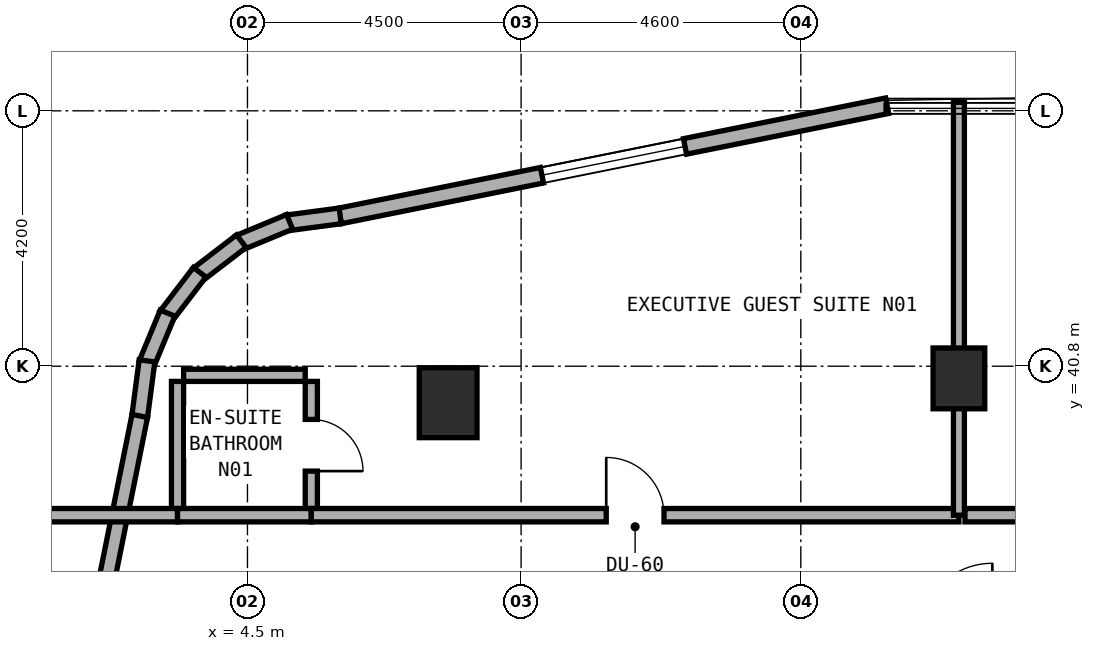
"""IFC4 building model, lengths in metres.
Left out: names, types, materials, properties, quantities, classifications, styles, units other than length and angle.
Written with IfcOpenShell. Run it as: python <this file> out.ifc"""

import sys

from ifc_helpers import new_model, si_unit, direction, frame, frame_2d, origin, origin_2d, place, context, subcontext, project, spatial, rectangle, extrude, element, fill, save


model = new_model("IFC4")
c1 = context("Model", 3, precision=1e-05, world=origin(), true_north=direction((0.0, 1.0)))
c2 = subcontext(c1, "Body", "Model", "MODEL_VIEW")
j1 = project(units=[si_unit("LENGTHUNIT", "METRE"), si_unit("PLANEANGLEUNIT", "RADIAN")], contexts=[c1])
p1 = place(None, origin())
s1 = spatial("IfcSite", under=j1, at=p1, CompositionType="ELEMENT")
p2 = place(p1, origin())
s2 = spatial("IfcBuilding", under=s1, at=p2, CompositionType="ELEMENT")
p3 = place(p2, frame((0.0, 0.0, 98.5)))
s3 = spatial("IfcBuildingStorey", under=s2, at=p3, CompositionType="ELEMENT", Elevation=98.5)
p4 = place(p3, frame((16.2, 40.6, 0.0), z_axis=(0.0, 0.0, 1.0), x_axis=(1.0, 0.0, 0.0)))
e1 = element("IfcColumn", 1, at=p4, inside=s3, PredefinedType="COLUMN", context=c2, shape_type="SweptSolid", body=[
    extrude(rectangle(XDim=0.85, YDim=1.0, at=origin_2d()), origin(), (0.0, 0.0, 1.0), 3.5),
])
p5 = place(p3, frame((7.8, 40.2, 0.0), z_axis=(0.0, 0.0, 1.0), x_axis=(1.0, 0.0, 0.0)))
e2 = element("IfcColumn", 2, at=p5, inside=s3, PredefinedType="COLUMN", context=c2, shape_type="SweptSolid", body=[
    extrude(rectangle(XDim=0.95, YDim=1.15, at=origin_2d()), origin(), (0.0, 0.0, 1.0), 3.5),
])
p6 = place(p3, frame((15.02, 45.084, 0.0), z_axis=(0.0, 0.0, 1.0), x_axis=(-0.980315963543, -0.197435082048, 0.0)))
e3 = element("IfcWall", 3, at=p6, inside=s3, PredefinedType="STANDARD", context=c2, shape_type="SweptSolid", body=[
    extrude(rectangle(XDim=9.183, YDim=0.26, at=frame_2d((4.591, 0.0))), origin(), (0.0, 0.0, 1.0), 3.22),
])
p7 = place(p6, frame((3.391, 0.0, 0.8)))
e4 = element("IfcOpeningElement", 4, at=p7, cuts=e3, PredefinedType="OPENING", context=c2, shape_type="SweptSolid", body=[
    extrude(rectangle(XDim=2.4, YDim=1.6, at=frame_2d((1.2, 0.8))), frame((0.0, 0.14, 0.0), z_axis=(0.0, -1.0, 0.0), x_axis=(1.0, 0.0, 0.0)), (0.0, 0.0, 1.0), 0.28),
])
p8 = place(p3, frame((6.025, 43.272, 0.0), z_axis=(0.0, 0.0, 1.0), x_axis=(-0.991388484223, -0.130953706898, 0.0)))
e5 = element("IfcWall", 5, at=p8, inside=s3, PredefinedType="STANDARD", context=c2, shape_type="SweptSolid", body=[
    extrude(rectangle(XDim=0.885, YDim=0.26, at=frame_2d((0.443, 0.0))), origin(), (0.0, 0.0, 1.0), 3.22),
])
p9 = place(p3, frame((5.193, 43.174, 0.0), z_axis=(0.0, 0.0, 1.0), x_axis=(-0.923627776508, -0.383290660547, 0.0)))
e6 = element("IfcWall", 6, at=p9, inside=s3, PredefinedType="STANDARD", context=c2, shape_type="SweptSolid", body=[
    extrude(rectangle(XDim=0.903, YDim=0.26, at=frame_2d((0.452, 0.0))), origin(), (0.0, 0.0, 1.0), 3.22),
])
p10 = place(p3, frame((4.399, 42.856, 0.0), z_axis=(0.0, 0.0, 1.0), x_axis=(-0.793458244748, -0.608624690463, 0.0)))
e7 = element("IfcWall", 7, at=p10, inside=s3, PredefinedType="STANDARD", context=c2, shape_type="SweptSolid", body=[
    extrude(rectangle(XDim=0.902, YDim=0.26, at=frame_2d((0.451, 0.0))), origin(), (0.0, 0.0, 1.0), 3.22),
])
p11 = place(p3, frame((3.714, 42.345, 0.0), z_axis=(0.0, 0.0, 1.0), x_axis=(-0.608494022858, -0.793558456666, 0.0)))
e8 = element("IfcWall", 8, at=p11, inside=s3, PredefinedType="STANDARD", context=c2, shape_type="SweptSolid", body=[
    extrude(rectangle(XDim=0.902, YDim=0.26, at=frame_2d((0.451, 0.0))), origin(), (0.0, 0.0, 1.0), 3.22),
])
p12 = place(p3, frame((3.186, 41.673, 0.0), z_axis=(0.0, 0.0, 1.0), x_axis=(-0.383155708213, -0.923683767999, 0.0)))
e9 = element("IfcWall", 9, at=p12, inside=s3, PredefinedType="STANDARD", context=c2, shape_type="SweptSolid", body=[
    extrude(rectangle(XDim=0.903, YDim=0.26, at=frame_2d((0.451, 0.0))), origin(), (0.0, 0.0, 1.0), 3.22),
])
p13 = place(p3, frame((2.848, 40.888, 0.0), z_axis=(0.0, 0.0, 1.0), x_axis=(-0.130200706103, -0.991487658083, 0.0)))
e10 = element("IfcWall", 10, at=p13, inside=s3, PredefinedType="STANDARD", context=c2, shape_type="SweptSolid", body=[
    extrude(rectangle(XDim=0.921, YDim=0.26, at=frame_2d((0.46, 0.0))), origin(), (0.0, 0.0, 1.0), 3.22),
])
p14 = place(p3, frame((2.729, 39.982, 0.0), z_axis=(0.0, 0.0, 1.0), x_axis=(-0.197435082048, -0.980315963543, 0.0)))
e11 = element("IfcWall", 11, at=p14, inside=s3, PredefinedType="STANDARD", context=c2, shape_type="SweptSolid", body=[
    extrude(rectangle(XDim=9.183, YDim=0.26, at=frame_2d((4.591, 0.0))), origin(), (0.0, 0.0, 1.0), 3.22),
])
p15 = place(p14, frame((4.286, 0.0, 0.8)))
e12 = element("IfcOpeningElement", 12, at=p15, cuts=e11, PredefinedType="OPENING", context=c2, shape_type="SweptSolid", body=[
    extrude(rectangle(XDim=2.4, YDim=1.6, at=frame_2d((1.2, 0.8))), frame((0.0, 0.14, 0.0), z_axis=(0.0, -1.0, 0.0), x_axis=(1.0, 0.0, 0.0)), (0.0, 0.0, 1.0), 0.28),
])
p16 = place(p3, frame((5.55, 38.45, 0.0), z_axis=(0.0, 0.0, 1.0), x_axis=(0.0, 1.0, 0.0)))
e13 = element("IfcWall", 13, at=p16, inside=s3, PredefinedType="PLUMBINGWALL", context=c2, shape_type="SweptSolid", body=[
    extrude(rectangle(XDim=2.1, YDim=0.2, at=frame_2d((1.05, 0.0))), origin(), (0.0, 0.0, 1.0), 3.22),
])
p17 = place(p16, frame((0.625, 0.0, 0.0)))
e14 = element("IfcOpeningElement", 14, at=p17, cuts=e13, PredefinedType="OPENING", context=c2, shape_type="SweptSolid", body=[
    extrude(rectangle(XDim=0.85, YDim=2.1, at=frame_2d((0.425, 1.05))), frame((0.0, 0.11, 0.0), z_axis=(0.0, -1.0, 0.0), x_axis=(1.0, 0.0, 0.0)), (0.0, 0.0, 1.0), 0.22),
])
p18 = place(p3, frame((3.45, 40.65, 0.0), z_axis=(0.0, 0.0, 1.0), x_axis=(1.0, 0.0, 0.0)))
e15 = element("IfcWall", 15, at=p18, inside=s3, PredefinedType="PLUMBINGWALL", context=c2, shape_type="SweptSolid", body=[
    extrude(rectangle(XDim=2.0, YDim=0.2, at=frame_2d((1.0, 0.0))), origin(), (0.0, 0.0, 1.0), 3.22),
])
p19 = place(p3, frame((3.35, 38.45, 0.0), z_axis=(0.0, 0.0, 1.0), x_axis=(0.0, 1.0, 0.0)))
e16 = element("IfcWall", 16, at=p19, inside=s3, PredefinedType="PLUMBINGWALL", context=c2, shape_type="SweptSolid", body=[
    extrude(rectangle(XDim=2.1, YDim=0.2, at=frame_2d((1.05, 0.0))), origin(), (0.0, 0.0, 1.0), 3.22),
])
p20 = place(p3, frame((0.96, 38.35, 0.0), z_axis=(0.0, 0.0, 1.0), x_axis=(1.0, 0.0, 0.0)))
e17 = element("IfcWall", 17, at=p20, inside=s3, PredefinedType="SOLIDWALL", context=c2, shape_type="SweptSolid", body=[
    extrude(rectangle(XDim=2.39, YDim=0.22, at=frame_2d((1.195, 0.0))), origin(), (0.0, 0.0, 1.0), 3.22),
])
p21 = place(p3, frame((3.35, 38.35, 0.0), z_axis=(0.0, 0.0, 1.0), x_axis=(1.0, 0.0, 0.0)))
e18 = element("IfcWall", 18, at=p21, inside=s3, PredefinedType="SOLIDWALL", context=c2, shape_type="SweptSolid", body=[
    extrude(rectangle(XDim=2.2, YDim=0.22, at=frame_2d((1.1, 0.0))), origin(), (0.0, 0.0, 1.0), 3.22),
])
p22 = place(p3, frame((5.55, 38.35, 0.0), z_axis=(0.0, 0.0, 1.0), x_axis=(1.0, 0.0, 0.0)))
e19 = element("IfcWall", 19, at=p22, inside=s3, PredefinedType="SOLIDWALL", context=c2, shape_type="SweptSolid", body=[
    extrude(rectangle(XDim=10.65, YDim=0.22, at=frame_2d((5.325, 0.0))), origin(), (0.0, 0.0, 1.0), 2.595),
])
p23 = place(p22, frame((4.85, 0.0, 0.0)))
e20 = element("IfcOpeningElement", 20, at=p23, cuts=e19, PredefinedType="OPENING", context=c2, shape_type="SweptSolid", body=[
    extrude(rectangle(XDim=0.95, YDim=2.1, at=frame_2d((0.475, 1.05))), frame((0.0, 0.12, 0.0), z_axis=(0.0, -1.0, 0.0), x_axis=(1.0, 0.0, 0.0)), (0.0, 0.0, 1.0), 0.24),
])
p24 = place(p3, frame((16.2, 38.35, 0.0), z_axis=(0.0, 0.0, 1.0), x_axis=(0.0, 1.0, 0.0)))
e21 = element("IfcWall", 21, at=p24, inside=s3, PredefinedType="SOLIDWALL", context=c2, shape_type="SweptSolid", body=[
    extrude(rectangle(XDim=6.79, YDim=0.18, at=frame_2d((3.395, 0.0))), origin(), (0.0, 0.0, 1.0), 2.595),
])
p25 = place(p3, frame((16.3, 38.35, 0.0), z_axis=(0.0, 0.0, 1.0), x_axis=(1.0, 0.0, 0.0)))
e22 = element("IfcWall", 22, at=p25, inside=s3, PredefinedType="SOLIDWALL", context=c2, shape_type="SweptSolid", body=[
    extrude(rectangle(XDim=9.4, YDim=0.22, at=frame_2d((4.7, 0.0))), origin(), (0.0, 0.0, 1.0), 3.22),
])
p26 = place(p25, frame((3.793, 0.0, 0.0)))
e23 = element("IfcOpeningElement", 23, at=p26, cuts=e22, PredefinedType="OPENING", context=c2, shape_type="SweptSolid", body=[
    extrude(rectangle(XDim=0.95, YDim=2.1, at=frame_2d((0.475, 1.05))), frame((0.0, 0.12, 0.0), z_axis=(0.0, -1.0, 0.0), x_axis=(1.0, 0.0, 0.0)), (0.0, 0.0, 1.0), 0.24),
])
p27 = place(p7, origin())
e24 = element("IfcWindow", 24, at=p27, inside=s3, PartitioningType="SINGLE_PANEL", PredefinedType="WINDOW", context=c2, shape_type="SweptSolid", body=[
    extrude(rectangle(XDim=2.4, YDim=1.6, at=frame_2d((1.2, 0.8))), frame((0.0, 0.03, 0.0), z_axis=(0.0, -1.0, 0.0), x_axis=(1.0, 0.0, 0.0)), (0.0, 0.0, 1.0), 0.06),
])
fill(e4, e24)
p28 = place(p17, frame((0.85, 0.0, 0.0), z_axis=(0.0, 0.0, 1.0), x_axis=(-1.0, 0.0, 0.0)))
e25 = element("IfcDoor", 25, at=p28, inside=s3, OperationType="SINGLE_SWING_RIGHT", PredefinedType="DOOR", context=c2, shape_type="SweptSolid", body=[
    extrude(rectangle(XDim=0.85, YDim=2.1, at=frame_2d((0.425, 1.05))), frame((0.0, 0.025, 0.0), z_axis=(0.0, -1.0, 0.0), x_axis=(1.0, 0.0, 0.0)), (0.0, 0.0, 1.0), 0.05),
])
fill(e14, e25)
p29 = place(p23, origin())
e26 = element("IfcDoor", 26, at=p29, inside=s3, OperationType="SINGLE_SWING_LEFT", PredefinedType="DOOR", context=c2, shape_type="SweptSolid", body=[
    extrude(rectangle(XDim=0.95, YDim=2.1, at=frame_2d((0.475, 1.05))), frame((0.0, 0.025, 0.0), z_axis=(0.0, -1.0, 0.0), x_axis=(1.0, 0.0, 0.0)), (0.0, 0.0, 1.0), 0.05),
])
fill(e20, e26)
save(model, sys.argv[1])
